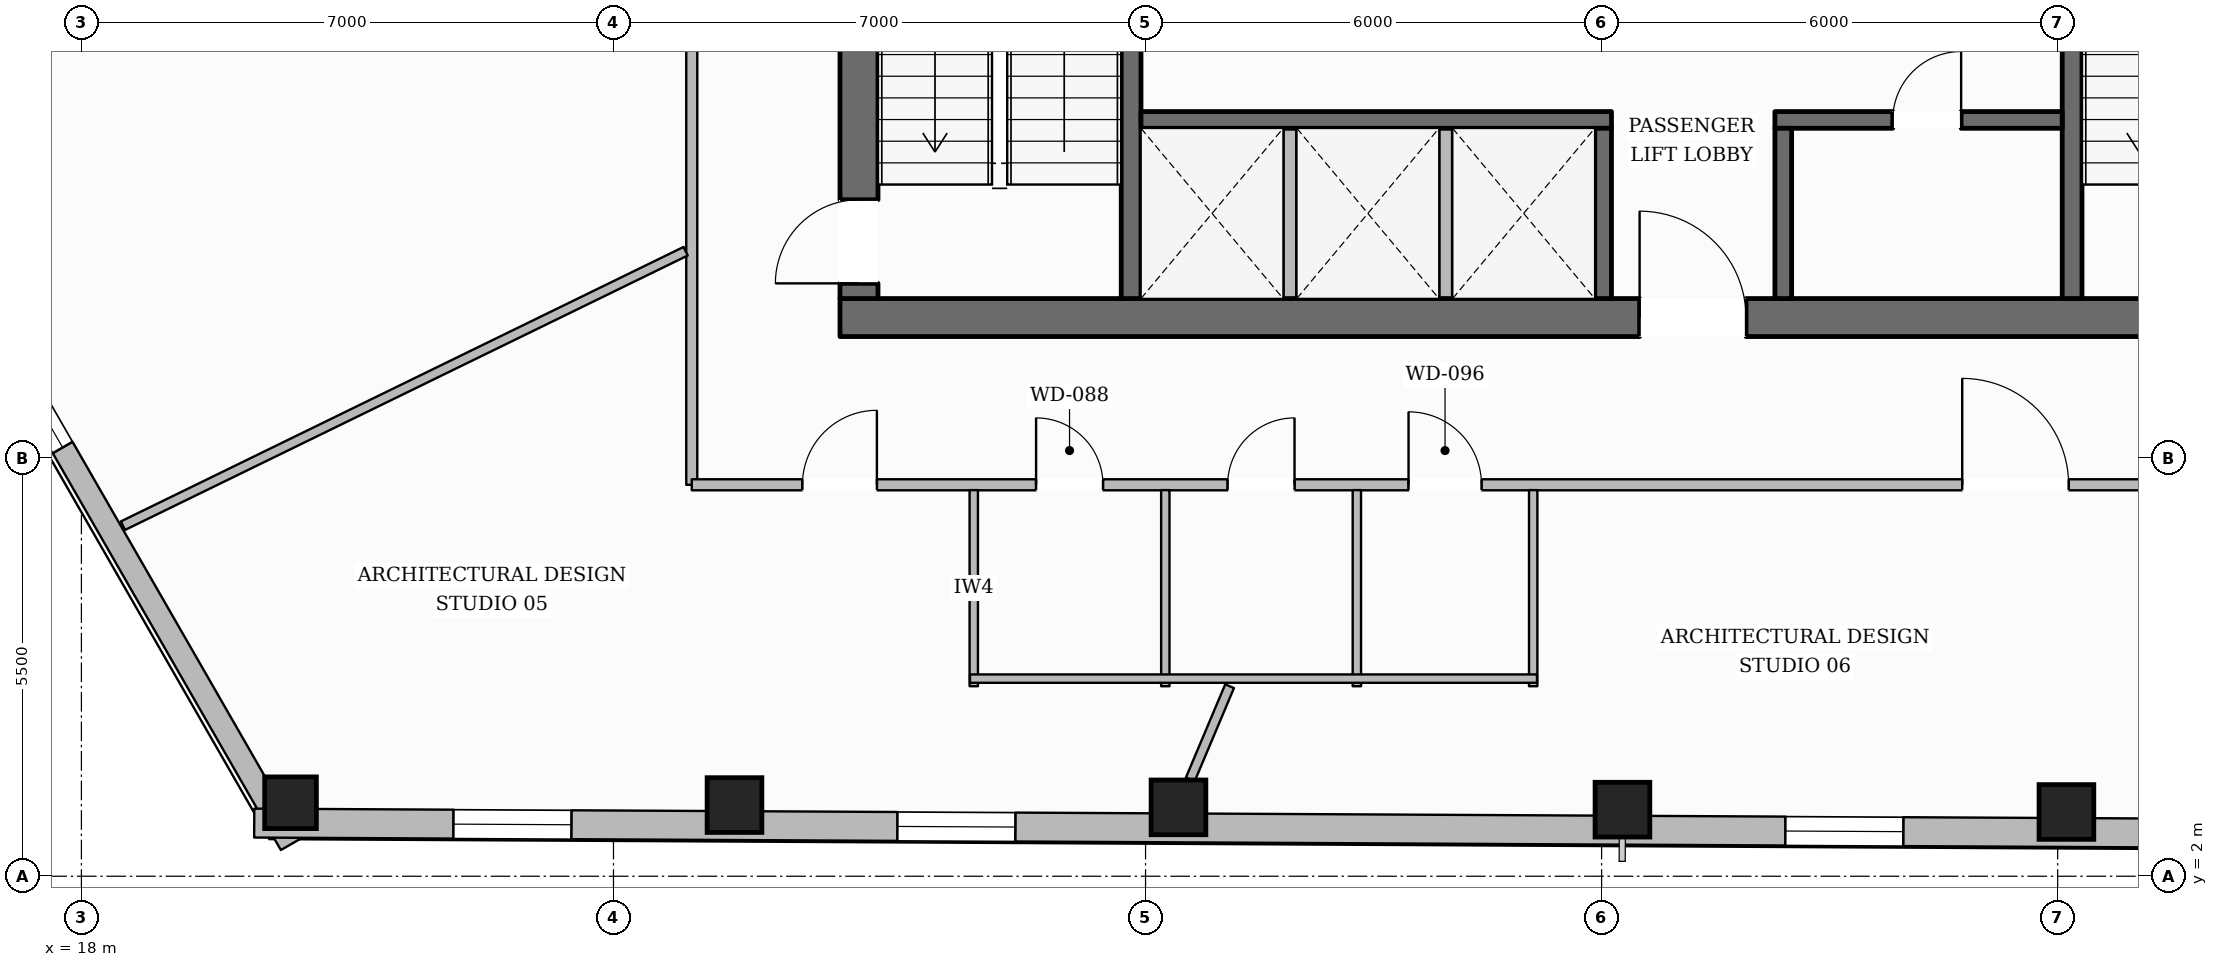
"""IFC4 building model, lengths in metres.
Left out: names, types, materials, properties, quantities, classifications, styles, units other than length and angle.
Written with IfcOpenShell. Run it as: python <this file> out.ifc"""

import sys

from ifc_helpers import new_model, si_unit, direction, frame, frame_2d, origin, origin_2d, place, context, subcontext, project, spatial, rectangle, hollow_rectangle, extrude, element, fill, save


model = new_model("IFC4")
c1 = context("Model", 3, precision=1e-05, world=origin(), true_north=direction((0.0, 1.0)))
c2 = subcontext(c1, "Body", "Model", "MODEL_VIEW")
j1 = project(units=[si_unit("LENGTHUNIT", "METRE"), si_unit("PLANEANGLEUNIT", "RADIAN")], contexts=[c1])
p1 = place(None, origin())
s1 = spatial("IfcSite", under=j1, at=p1, CompositionType="ELEMENT")
p2 = place(p1, origin())
s2 = spatial("IfcBuilding", under=s1, at=p2, CompositionType="ELEMENT")
p3 = place(p2, frame((0.0, 0.0, 104.75)))
s3 = spatial("IfcBuildingStorey", under=s2, at=p3, CompositionType="ELEMENT", Elevation=104.75)
p4 = place(p3, frame((27.98, 9.35, 0.0), z_axis=(0.0, 0.0, 1.0), x_axis=(1.0, 0.0, 0.0)))
e1 = element("IfcWall", 1, at=p4, inside=s3, PredefinedType="SOLIDWALL", context=c2, shape_type="SweptSolid", body=[
    extrude(rectangle(XDim=20.04, YDim=0.5, at=frame_2d((10.02, 0.0))), origin(), (0.0, 0.0, 1.0), 3.6),
])
p5 = place(p4, frame((10.52, 0.0, 0.0)))
e2 = element("IfcOpeningElement", 2, at=p5, cuts=e1, PredefinedType="OPENING", context=c2, shape_type="SweptSolid", body=[
    extrude(rectangle(XDim=1.4, YDim=2.2, at=frame_2d((0.7, 1.1))), frame((0.0, 0.26, 0.0), z_axis=(0.0, -1.0, 0.0), x_axis=(1.0, 0.0, 0.0)), (0.0, 0.0, 1.0), 0.52),
])
p6 = place(p3, frame((28.23, 9.6, 0.0), z_axis=(0.0, 0.0, 1.0), x_axis=(0.0, 1.0, 0.0)))
e3 = element("IfcWall", 3, at=p6, inside=s3, PredefinedType="SOLIDWALL", context=c2, shape_type="SweptSolid", body=[
    extrude(rectangle(XDim=13.0, YDim=0.5, at=frame_2d((6.5, 0.0))), origin(), (0.0, 0.0, 1.0), 3.6),
])
p7 = place(p6, frame((0.2, 0.0, 0.0)))
e4 = element("IfcOpeningElement", 4, at=p7, cuts=e3, PredefinedType="OPENING", context=c2, shape_type="SweptSolid", body=[
    extrude(rectangle(XDim=1.1, YDim=2.15, at=frame_2d((0.55, 1.075))), frame((0.0, 0.26, 0.0), z_axis=(0.0, -1.0, 0.0), x_axis=(1.0, 0.0, 0.0)), (0.0, 0.0, 1.0), 0.52),
])
p8 = place(p6, frame((8.4, 0.0, 0.0)))
e5 = element("IfcOpeningElement", 5, at=p8, cuts=e3, PredefinedType="OPENING", context=c2, shape_type="SweptSolid", body=[
    extrude(rectangle(XDim=0.9, YDim=2.1, at=frame_2d((0.45, 1.05))), frame((0.0, 0.26, 0.0), z_axis=(0.0, -1.0, 0.0), x_axis=(1.0, 0.0, 0.0)), (0.0, 0.0, 1.0), 0.52),
])
p9 = place(p3, frame((31.81, 9.6, 0.0), z_axis=(0.0, 0.0, 1.0), x_axis=(0.0, 1.0, 0.0)))
e6 = element("IfcWall", 6, at=p9, inside=s3, PredefinedType="SHEAR", context=c2, shape_type="SweptSolid", body=[
    extrude(rectangle(XDim=13.0, YDim=0.26, at=frame_2d((6.5, 0.0))), origin(), (0.0, 0.0, 1.0), 3.6),
])
p10 = place(p9, frame((10.925, 0.0, 0.0)))
e7 = element("IfcOpeningElement", 7, at=p10, cuts=e6, PredefinedType="OPENING", context=c2, shape_type="SweptSolid", body=[
    extrude(rectangle(XDim=1.25, YDim=2.25, at=frame_2d((0.625, 1.125))), frame((0.0, 0.14, 0.0), z_axis=(0.0, -1.0, 0.0), x_axis=(1.0, 0.0, 0.0)), (0.0, 0.0, 1.0), 0.28),
])
p11 = place(p3, frame((44.19, 9.6, 0.0), z_axis=(0.0, 0.0, 1.0), x_axis=(0.0, 1.0, 0.0)))
e8 = element("IfcWall", 8, at=p11, inside=s3, PredefinedType="SHEAR", context=c2, shape_type="SweptSolid", body=[
    extrude(rectangle(XDim=13.0, YDim=0.26, at=frame_2d((6.5, 0.0))), origin(), (0.0, 0.0, 1.0), 3.6),
])
p12 = place(p11, frame((10.925, 0.0, 0.0)))
e9 = element("IfcOpeningElement", 9, at=p12, cuts=e8, PredefinedType="OPENING", context=c2, shape_type="SweptSolid", body=[
    extrude(rectangle(XDim=1.25, YDim=2.25, at=frame_2d((0.625, 1.125))), frame((0.0, 0.14, 0.0), z_axis=(0.0, -1.0, 0.0), x_axis=(1.0, 0.0, 0.0)), (0.0, 0.0, 1.0), 0.28),
])
p13 = place(p3, frame((31.94, 11.95, 0.0), z_axis=(0.0, 0.0, 1.0), x_axis=(1.0, 0.0, 0.0)))
e10 = element("IfcWall", 10, at=p13, inside=s3, PredefinedType="SOLIDWALL", context=c2, shape_type="SweptSolid", body=[
    extrude(rectangle(XDim=6.19, YDim=0.22, at=frame_2d((3.095, 0.0))), origin(), (0.0, 0.0, 1.0), 3.6),
])
p14 = place(p3, frame((40.28, 11.95, 0.0), z_axis=(0.0, 0.0, 1.0), x_axis=(1.0, 0.0, 0.0)))
e11 = element("IfcWall", 11, at=p14, inside=s3, PredefinedType="SOLIDWALL", context=c2, shape_type="SweptSolid", body=[
    extrude(rectangle(XDim=3.78, YDim=0.22, at=frame_2d((1.89, 0.0))), origin(), (0.0, 0.0, 1.0), 3.6),
])
p15 = place(p14, frame((1.55, 0.0, 0.0)))
e12 = element("IfcOpeningElement", 12, at=p15, cuts=e11, PredefinedType="OPENING", context=c2, shape_type="SweptSolid", body=[
    extrude(rectangle(XDim=0.9, YDim=2.1, at=frame_2d((0.45, 1.05))), frame((0.0, 0.12, 0.0), z_axis=(0.0, -1.0, 0.0), x_axis=(1.0, 0.0, 0.0)), (0.0, 0.0, 1.0), 0.24),
])
for number, where, z_axis, x_axis in (
    (13, (38.02, 9.6, 0.0), (0.0, 0.0, 1.0), (0.0, 1.0, 0.0)),
    (14, (40.39, 9.6, 0.0), (0.0, 0.0, 1.0), (0.0, 1.0, 0.0)),
):
    element("IfcWall", number, at=place(p3, frame(where, z_axis=z_axis, x_axis=x_axis)), inside=s3, PredefinedType="SOLIDWALL", context=c2, shape_type="SweptSolid", body=[
        extrude(rectangle(XDim=2.24, YDim=0.22, at=frame_2d((1.12, 0.0))), origin(), (0.0, 0.0, 1.0), 3.6),
    ])
p16 = place(p3, frame((20.751, 2.967, 0.0), z_axis=(0.0, 0.0, 1.0), x_axis=(1.0, 0.0, 0.0)))
e15 = element("IfcColumn", 15, at=p16, inside=s3, PredefinedType="COLUMN", context=c2, shape_type="SweptSolid", body=[
    extrude(hollow_rectangle(XDim=0.68, YDim=0.68, WallThickness=0.03, at=origin_2d()), origin(), (0.0, 0.0, 1.0), 3.6),
])
for number, where, z_axis, x_axis in (
    (16, (26.592, 2.937, 0.0), (0.0, 0.0, 1.0), (1.0, 0.0, 0.0)),
    (17, (32.433, 2.906, 0.0), (0.0, 0.0, 1.0), (1.0, 0.0, 0.0)),
    (18, (38.274, 2.876, 0.0), (0.0, 0.0, 1.0), (1.0, 0.0, 0.0)),
    (19, (44.115, 2.845, 0.0), (0.0, 0.0, 1.0), (1.0, 0.0, 0.0)),
):
    element("IfcColumn", number, at=place(p3, frame(where, z_axis=z_axis, x_axis=x_axis)), inside=s3, PredefinedType="COLUMN", context=c2, shape_type="SweptSolid", body=[
        extrude(hollow_rectangle(XDim=0.72, YDim=0.72, WallThickness=0.032, at=origin_2d()), origin(), (0.0, 0.0, 1.0), 3.6),
    ])
p17 = place(p3, frame((20.754, 2.419, 0.0), z_axis=(0.0, 0.0, 1.0), x_axis=(-0.49837034912, 0.866964240969, 0.0)))
e20 = element("IfcWall", 20, at=p17, inside=s3, PredefinedType="STANDARD", context=c2, shape_type="SweptSolid", body=[
    extrude(rectangle(XDim=13.246, YDim=0.3, at=frame_2d((6.623, 0.0))), origin(), (0.0, 0.0, 1.0), 3.059),
])
p18 = place(p17, frame((6.023, 0.0, 0.65)))
e21 = element("IfcOpeningElement", 21, at=p18, cuts=e20, PredefinedType="OPENING", context=c2, shape_type="SweptSolid", body=[
    extrude(rectangle(XDim=1.2, YDim=1.7, at=frame_2d((0.6, 0.85))), frame((0.0, 0.16, 0.0), z_axis=(0.0, -1.0, 0.0), x_axis=(1.0, 0.0, 0.0)), (0.0, 0.0, 1.0), 0.32),
])
p19 = place(p3, frame((56.277, 2.512, 0.0), z_axis=(0.0, 0.0, 1.0), x_axis=(-0.999986545033, 0.005187461141, 0.0)))
e22 = element("IfcWall", 22, at=p19, inside=s3, PredefinedType="STANDARD", context=c2, shape_type="SweptSolid", body=[
    extrude(rectangle(XDim=36.004, YDim=0.38, at=frame_2d((18.002, 0.0))), origin(), (0.0, 0.0, 1.0), 3.059),
])
p20 = place(p19, frame((31.832, 0.0, 0.65)))
e23 = element("IfcOpeningElement", 23, at=p20, cuts=e22, PredefinedType="OPENING", context=c2, shape_type="SweptSolid", body=[
    extrude(rectangle(XDim=1.55, YDim=1.75, at=frame_2d((0.775, 0.875))), frame((0.0, 0.2, 0.0), z_axis=(0.0, -1.0, 0.0), x_axis=(1.0, 0.0, 0.0)), (0.0, 0.0, 1.0), 0.4),
])
p21 = place(p19, frame((25.991, 0.0, 0.65)))
e24 = element("IfcOpeningElement", 24, at=p21, cuts=e22, PredefinedType="OPENING", context=c2, shape_type="SweptSolid", body=[
    extrude(rectangle(XDim=1.55, YDim=1.75, at=frame_2d((0.775, 0.875))), frame((0.0, 0.2, 0.0), z_axis=(0.0, -1.0, 0.0), x_axis=(1.0, 0.0, 0.0)), (0.0, 0.0, 1.0), 0.4),
])
p22 = place(p19, frame((14.309, 0.0, 0.65)))
e25 = element("IfcOpeningElement", 25, at=p22, cuts=e22, PredefinedType="OPENING", context=c2, shape_type="SweptSolid", body=[
    extrude(rectangle(XDim=1.55, YDim=1.75, at=frame_2d((0.775, 0.875))), frame((0.0, 0.2, 0.0), z_axis=(0.0, -1.0, 0.0), x_axis=(1.0, 0.0, 0.0)), (0.0, 0.0, 1.0), 0.4),
])
p23 = place(p19, frame((8.468, 0.0, 0.65)))
e26 = element("IfcOpeningElement", 26, at=p23, cuts=e22, PredefinedType="OPENING", context=c2, shape_type="SweptSolid", body=[
    extrude(rectangle(XDim=1.55, YDim=1.75, at=frame_2d((0.775, 0.875))), frame((0.0, 0.2, 0.0), z_axis=(0.0, -1.0, 0.0), x_axis=(1.0, 0.0, 0.0)), (0.0, 0.0, 1.0), 0.4),
])
p24 = place(p19, frame((2.627, 0.0, 0.65)))
e27 = element("IfcOpeningElement", 27, at=p24, cuts=e22, PredefinedType="OPENING", context=c2, shape_type="SweptSolid", body=[
    extrude(rectangle(XDim=1.55, YDim=1.75, at=frame_2d((0.775, 0.875))), frame((0.0, 0.2, 0.0), z_axis=(0.0, -1.0, 0.0), x_axis=(1.0, 0.0, 0.0)), (0.0, 0.0, 1.0), 0.4),
])
for number, where, z_axis, x_axis in (
    (28, (33.9, 9.55, 0.0), (0.0, 0.0, 1.0), (0.0, 1.0, 0.0)),
    (29, (35.95, 9.55, 0.0), (0.0, 0.0, 1.0), (0.0, 1.0, 0.0)),
):
    element("IfcWall", number, at=place(p3, frame(where, z_axis=z_axis, x_axis=x_axis)), inside=s3, PredefinedType="PARTITIONING", context=c2, shape_type="SweptSolid", body=[
        extrude(rectangle(XDim=2.29, YDim=0.165, at=frame_2d((1.145, 0.0))), origin(), (0.0, 0.0, 1.0), 3.6),
    ])
p25 = place(p3, frame((26.03, 25.05, 0.0), z_axis=(0.0, 0.0, 1.0), x_axis=(0.0, -1.0, 0.0)))
e30 = element("IfcWall", 30, at=p25, inside=s3, PredefinedType="PARTITIONING", context=c2, shape_type="SweptSolid", body=[
    extrude(rectangle(XDim=17.9, YDim=0.145, at=frame_2d((8.95, 0.0))), origin(), (0.0, 0.0, 1.0), 3.288),
])
p26 = place(p25, frame((7.016, 0.0, 0.0)))
e31 = element("IfcOpeningElement", 31, at=p26, cuts=e30, PredefinedType="OPENING", context=c2, shape_type="SweptSolid", body=[
    extrude(rectangle(XDim=1.4, YDim=2.2, at=frame_2d((0.7, 1.1))), frame((0.0, 0.083, 0.0), z_axis=(0.0, -1.0, 0.0), x_axis=(1.0, 0.0, 0.0)), (0.0, 0.0, 1.0), 0.165),
])
p27 = place(p3, frame((26.03, 7.15, 0.0), z_axis=(0.0, 0.0, 1.0), x_axis=(1.0, 0.0, 0.0)))
e32 = element("IfcWall", 32, at=p27, inside=s3, PredefinedType="PARTITIONING", context=c2, shape_type="SweptSolid", body=[
    extrude(rectangle(XDim=23.94, YDim=0.145, at=frame_2d((11.97, 0.0))), origin(), (0.0, 0.0, 1.0), 3.6),
])
p28 = place(p27, frame((4.53, 0.0, 0.0)))
e33 = element("IfcOpeningElement", 33, at=p28, cuts=e32, PredefinedType="OPENING", context=c2, shape_type="SweptSolid", body=[
    extrude(rectangle(XDim=0.88, YDim=2.1, at=frame_2d((0.44, 1.05))), frame((0.0, 0.083, 0.0), z_axis=(0.0, -1.0, 0.0), x_axis=(1.0, 0.0, 0.0)), (0.0, 0.0, 1.0), 0.165),
])
p29 = place(p27, frame((7.05, 0.0, 0.0)))
e34 = element("IfcOpeningElement", 34, at=p29, cuts=e32, PredefinedType="OPENING", context=c2, shape_type="SweptSolid", body=[
    extrude(rectangle(XDim=0.88, YDim=2.1, at=frame_2d((0.44, 1.05))), frame((0.0, 0.083, 0.0), z_axis=(0.0, -1.0, 0.0), x_axis=(1.0, 0.0, 0.0)), (0.0, 0.0, 1.0), 0.165),
])
p30 = place(p27, frame((9.43, 0.0, 0.0)))
e35 = element("IfcOpeningElement", 35, at=p30, cuts=e32, PredefinedType="OPENING", context=c2, shape_type="SweptSolid", body=[
    extrude(rectangle(XDim=0.96, YDim=2.1, at=frame_2d((0.48, 1.05))), frame((0.0, 0.083, 0.0), z_axis=(0.0, -1.0, 0.0), x_axis=(1.0, 0.0, 0.0)), (0.0, 0.0, 1.0), 0.165),
])
p31 = place(p27, frame((1.456, 0.0, 0.0)))
e36 = element("IfcOpeningElement", 36, at=p31, cuts=e32, PredefinedType="OPENING", context=c2, shape_type="SweptSolid", body=[
    extrude(rectangle(XDim=0.98, YDim=2.15, at=frame_2d((0.49, 1.075))), frame((0.0, 0.083, 0.0), z_axis=(0.0, -1.0, 0.0), x_axis=(1.0, 0.0, 0.0)), (0.0, 0.0, 1.0), 0.165),
])
p32 = place(p27, frame((16.714, 0.0, 0.0)))
e37 = element("IfcOpeningElement", 37, at=p32, cuts=e32, PredefinedType="OPENING", context=c2, shape_type="SweptSolid", body=[
    extrude(rectangle(XDim=1.4, YDim=2.2, at=frame_2d((0.7, 1.1))), frame((0.0, 0.083, 0.0), z_axis=(0.0, -1.0, 0.0), x_axis=(1.0, 0.0, 0.0)), (0.0, 0.0, 1.0), 0.165),
])
p33 = place(p3, frame((29.74, 4.5, 0.0), z_axis=(0.0, 0.0, 1.0), x_axis=(0.0, 1.0, 0.0)))
e38 = element("IfcWall", 38, at=p33, inside=s3, PredefinedType="PLUMBINGWALL", context=c2, shape_type="SweptSolid", body=[
    extrude(rectangle(XDim=2.58, YDim=0.11, at=frame_2d((1.29, 0.0))), origin(), (0.0, 0.0, 1.0), 3.6),
])
p34 = place(p3, frame((32.26, 4.5, 0.0), z_axis=(0.0, 0.0, 1.0), x_axis=(0.0, 1.0, 0.0)))
e39 = element("IfcWall", 39, at=p34, inside=s3, PredefinedType="PLUMBINGWALL", context=c2, shape_type="SweptSolid", body=[
    extrude(rectangle(XDim=2.58, YDim=0.11, at=frame_2d((1.29, 0.0))), origin(), (0.0, 0.0, 1.0), 3.141),
])
for number, where, z_axis, x_axis in (
    (40, (34.78, 4.5, 0.0), (0.0, 0.0, 1.0), (0.0, 1.0, 0.0)),
    (41, (37.1, 4.5, 0.0), (0.0, 0.0, 1.0), (0.0, 1.0, 0.0)),
):
    element("IfcWall", number, at=place(p3, frame(where, z_axis=z_axis, x_axis=x_axis)), inside=s3, PredefinedType="PLUMBINGWALL", context=c2, shape_type="SweptSolid", body=[
        extrude(rectangle(XDim=2.58, YDim=0.11, at=frame_2d((1.29, 0.0))), origin(), (0.0, 0.0, 1.0), 3.6),
    ])
p35 = place(p3, frame((29.69, 4.6, 0.0), z_axis=(0.0, 0.0, 1.0), x_axis=(1.0, 0.0, 0.0)))
e42 = element("IfcWall", 42, at=p35, inside=s3, PredefinedType="PLUMBINGWALL", context=c2, shape_type="SweptSolid", body=[
    extrude(rectangle(XDim=7.46, YDim=0.11, at=frame_2d((3.73, 0.0))), origin(), (0.0, 0.0, 1.0), 3.6),
])
p36 = place(p3, frame((25.949, 10.223, 0.0), z_axis=(0.0, 0.0, 1.0), x_axis=(-0.898788385453, -0.438382753054, 0.0)))
e43 = element("IfcWall", 43, at=p36, inside=s3, PredefinedType="PARTITIONING", context=c2, shape_type="SweptSolid", body=[
    extrude(rectangle(XDim=8.237, YDim=0.125, at=frame_2d((4.118, 0.0))), origin(), (0.0, 0.0, 1.0), 3.6),
])
p37 = place(p3, frame((33.106, 4.5, 0.0), z_axis=(0.0, 0.0, 1.0), x_axis=(-0.388819762507, -0.921313840276, 0.0)))
e44 = element("IfcWall", 44, at=p37, inside=s3, PredefinedType="PARTITIONING", context=c2, shape_type="SweptSolid", body=[
    extrude(rectangle(XDim=1.331, YDim=0.125, at=frame_2d((0.665, 0.0))), origin(), (0.0, 0.0, 1.0), 3.6),
])
p38 = place(p20, origin())
e45 = element("IfcWindow", 45, at=p38, inside=s3, PartitioningType="SINGLE_PANEL", PredefinedType="WINDOW", context=c2, shape_type="SweptSolid", body=[
    extrude(rectangle(XDim=1.55, YDim=1.75, at=frame_2d((0.775, 0.875))), frame((0.0, 0.03, 0.0), z_axis=(0.0, -1.0, 0.0), x_axis=(1.0, 0.0, 0.0)), (0.0, 0.0, 1.0), 0.06),
])
fill(e23, e45)
p39 = place(p21, origin())
e46 = element("IfcWindow", 46, at=p39, inside=s3, PartitioningType="SINGLE_PANEL", PredefinedType="WINDOW", context=c2, shape_type="SweptSolid", body=[
    extrude(rectangle(XDim=1.55, YDim=1.75, at=frame_2d((0.775, 0.875))), frame((0.0, 0.03, 0.0), z_axis=(0.0, -1.0, 0.0), x_axis=(1.0, 0.0, 0.0)), (0.0, 0.0, 1.0), 0.06),
])
fill(e24, e46)
p40 = place(p22, origin())
e47 = element("IfcWindow", 47, at=p40, inside=s3, PartitioningType="SINGLE_PANEL", PredefinedType="WINDOW", context=c2, shape_type="SweptSolid", body=[
    extrude(rectangle(XDim=1.55, YDim=1.75, at=frame_2d((0.775, 0.875))), frame((0.0, 0.03, 0.0), z_axis=(0.0, -1.0, 0.0), x_axis=(1.0, 0.0, 0.0)), (0.0, 0.0, 1.0), 0.06),
])
fill(e25, e47)
p41 = place(p18, origin())
e48 = element("IfcWindow", 48, at=p41, inside=s3, PartitioningType="SINGLE_PANEL", PredefinedType="WINDOW", context=c2, shape_type="SweptSolid", body=[
    extrude(rectangle(XDim=1.2, YDim=1.7, at=frame_2d((0.6, 0.85))), frame((0.0, 0.03, 0.0), z_axis=(0.0, -1.0, 0.0), x_axis=(1.0, 0.0, 0.0)), (0.0, 0.0, 1.0), 0.06),
])
fill(e21, e48)
p42 = place(p7, origin())
e49 = element("IfcDoor", 49, at=p42, inside=s3, OperationType="SINGLE_SWING_LEFT", PredefinedType="DOOR", context=c2, shape_type="SweptSolid", body=[
    extrude(rectangle(XDim=1.1, YDim=2.15, at=frame_2d((0.55, 1.075))), frame((0.0, 0.025, 0.0), z_axis=(0.0, -1.0, 0.0), x_axis=(1.0, 0.0, 0.0)), (0.0, 0.0, 1.0), 0.05),
])
fill(e4, e49)
p43 = place(p5, origin())
e50 = element("IfcDoor", 50, at=p43, inside=s3, OperationType="SINGLE_SWING_LEFT", PredefinedType="DOOR", context=c2, shape_type="SweptSolid", body=[
    extrude(rectangle(XDim=1.4, YDim=2.2, at=frame_2d((0.7, 1.1))), frame((0.0, 0.025, 0.0), z_axis=(0.0, -1.0, 0.0), x_axis=(1.0, 0.0, 0.0)), (0.0, 0.0, 1.0), 0.05),
])
fill(e2, e50)
p44 = place(p15, origin())
e51 = element("IfcDoor", 51, at=p44, inside=s3, OperationType="SINGLE_SWING_RIGHT", PredefinedType="DOOR", context=c2, shape_type="SweptSolid", body=[
    extrude(rectangle(XDim=0.9, YDim=2.1, at=frame_2d((0.45, 1.05))), frame((0.0, 0.025, 0.0), z_axis=(0.0, -1.0, 0.0), x_axis=(1.0, 0.0, 0.0)), (0.0, 0.0, 1.0), 0.05),
])
fill(e12, e51)
p45 = place(p28, origin())
e52 = element("IfcDoor", 52, at=p45, inside=s3, OperationType="SINGLE_SWING_LEFT", PredefinedType="DOOR", context=c2, shape_type="SweptSolid", body=[
    extrude(rectangle(XDim=0.88, YDim=2.1, at=frame_2d((0.44, 1.05))), frame((0.0, 0.025, 0.0), z_axis=(0.0, -1.0, 0.0), x_axis=(1.0, 0.0, 0.0)), (0.0, 0.0, 1.0), 0.05),
])
fill(e33, e52)
p46 = place(p29, origin())
e53 = element("IfcDoor", 53, at=p46, inside=s3, OperationType="SINGLE_SWING_RIGHT", PredefinedType="DOOR", context=c2, shape_type="SweptSolid", body=[
    extrude(rectangle(XDim=0.88, YDim=2.1, at=frame_2d((0.44, 1.05))), frame((0.0, 0.025, 0.0), z_axis=(0.0, -1.0, 0.0), x_axis=(1.0, 0.0, 0.0)), (0.0, 0.0, 1.0), 0.05),
])
fill(e34, e53)
p47 = place(p30, origin())
e54 = element("IfcDoor", 54, at=p47, inside=s3, OperationType="SINGLE_SWING_LEFT", PredefinedType="DOOR", context=c2, shape_type="SweptSolid", body=[
    extrude(rectangle(XDim=0.96, YDim=2.1, at=frame_2d((0.48, 1.05))), frame((0.0, 0.025, 0.0), z_axis=(0.0, -1.0, 0.0), x_axis=(1.0, 0.0, 0.0)), (0.0, 0.0, 1.0), 0.05),
])
fill(e35, e54)
p48 = place(p31, origin())
e55 = element("IfcDoor", 55, at=p48, inside=s3, OperationType="SINGLE_SWING_RIGHT", PredefinedType="DOOR", context=c2, shape_type="SweptSolid", body=[
    extrude(rectangle(XDim=0.98, YDim=2.15, at=frame_2d((0.49, 1.075))), frame((0.0, 0.025, 0.0), z_axis=(0.0, -1.0, 0.0), x_axis=(1.0, 0.0, 0.0)), (0.0, 0.0, 1.0), 0.05),
])
fill(e36, e55)
p49 = place(p32, origin())
e56 = element("IfcDoor", 56, at=p49, inside=s3, OperationType="SINGLE_SWING_LEFT", PredefinedType="DOOR", context=c2, shape_type="SweptSolid", body=[
    extrude(rectangle(XDim=1.4, YDim=2.2, at=frame_2d((0.7, 1.1))), frame((0.0, 0.025, 0.0), z_axis=(0.0, -1.0, 0.0), x_axis=(1.0, 0.0, 0.0)), (0.0, 0.0, 1.0), 0.05),
])
fill(e37, e56)
save(model, sys.argv[1])
